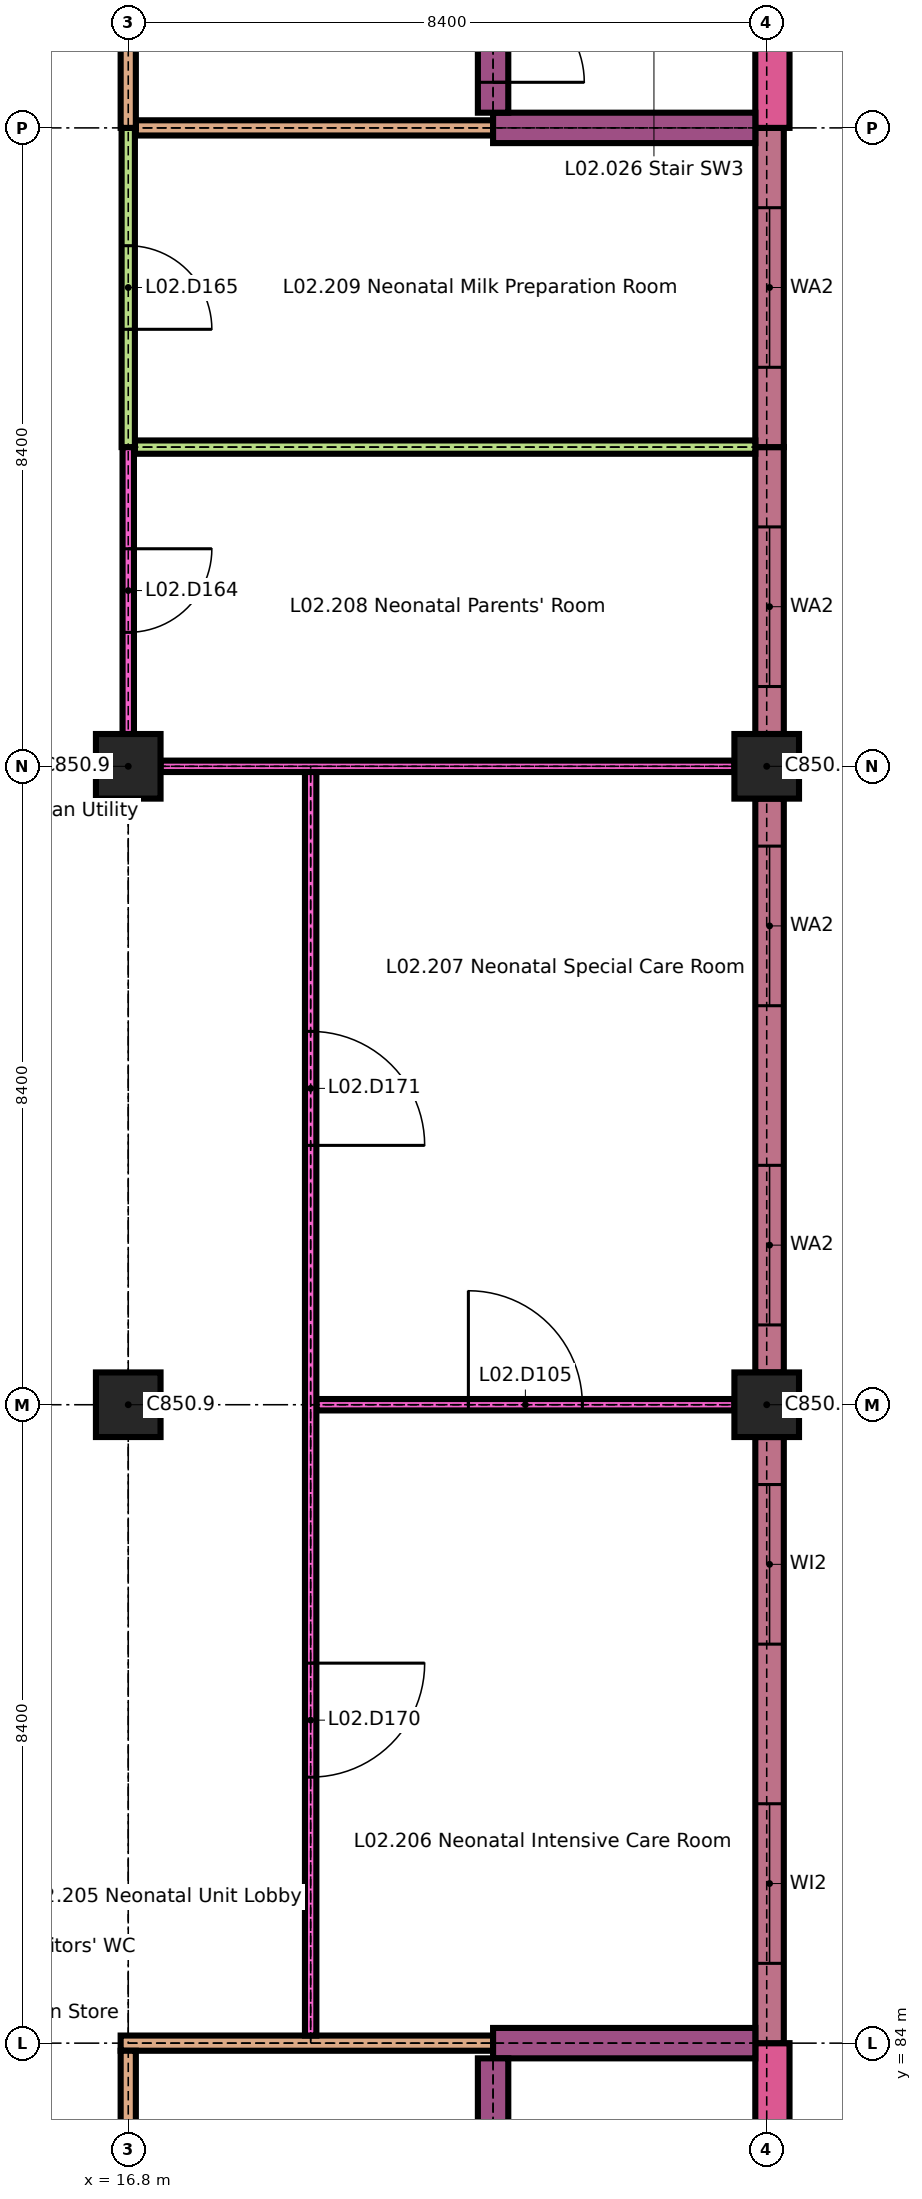
"""IFC4 building model, lengths in metres.
Left out: names, types, materials, properties, quantities, classifications, styles, units other than length and angle.
Written with IfcOpenShell. Run it as: python <this file> out.ifc"""

import sys

from ifc_helpers import new_model, si_unit, direction, frame, frame_2d, origin, origin_2d, place, context, subcontext, project, spatial, rectangle, extrude, element, fill, save


model = new_model("IFC4")
c1 = context("Model", 3, precision=1e-05, world=origin(), true_north=direction((0.0, 1.0)))
c2 = subcontext(c1, "Body", "Model", "MODEL_VIEW")
j1 = project(units=[si_unit("LENGTHUNIT", "METRE"), si_unit("PLANEANGLEUNIT", "RADIAN")], contexts=[c1])
p1 = place(None, origin())
s1 = spatial("IfcSite", under=j1, at=p1, CompositionType="ELEMENT")
p2 = place(p1, origin())
s2 = spatial("IfcBuilding", under=s1, at=p2, CompositionType="ELEMENT")
p3 = place(p2, frame((0.0, 0.0, 8.4)))
s3 = spatial("IfcBuildingStorey", under=s2, at=p3, CompositionType="ELEMENT", Elevation=8.4)
for number, where, z_axis, x_axis in (
    (1, (16.8, 92.4, 0.0), (0.0, 0.0, 1.0), (1.0, 0.0, 0.0)),
    (2, (25.2, 92.4, 0.0), (0.0, 0.0, 1.0), (1.0, 0.0, 0.0)),
    (3, (16.8, 100.8, 0.0), (0.0, 0.0, 1.0), (1.0, 0.0, 0.0)),
    (4, (25.2, 100.8, 0.0), (0.0, 0.0, 1.0), (1.0, 0.0, 0.0)),
):
    element("IfcColumn", number, at=place(p3, frame(where, z_axis=z_axis, x_axis=x_axis)), inside=s3, PredefinedType="COLUMN", context=c2, shape_type="SweptSolid", body=[
        extrude(rectangle(XDim=0.85, YDim=0.85, at=origin_2d()), origin(), (0.0, 0.0, 1.0), 4.2),
    ])
p4 = place(p3, frame((25.275, 80.15, 0.0), z_axis=(0.0, 0.0, 1.0), x_axis=(0.0, 1.0, 0.0)))
e5 = element("IfcWall", 5, at=p4, inside=s3, PredefinedType="SOLIDWALL", context=c2, shape_type="SweptSolid", body=[
    extrude(rectangle(XDim=3.85, YDim=0.45, at=frame_2d((1.925, 0.0))), origin(), (0.0, 0.0, 1.0), 4.2),
])
p5 = place(p3, frame((25.238, 84.0, 0.0), z_axis=(0.0, 0.0, 1.0), x_axis=(0.0, 1.0, 0.0)))
e6 = element("IfcWall", 6, at=p5, inside=s3, PredefinedType="SOLIDWALL", context=c2, shape_type="SweptSolid", body=[
    extrude(rectangle(XDim=7.975, YDim=0.375, at=frame_2d((3.988, 0.0))), origin(), (0.0, 0.0, 1.0), 3.9),
])
p6 = place(p5, frame((1.05, 0.0, 0.9)))
e7 = element("IfcOpeningElement", 7, at=p6, cuts=e6, PredefinedType="OPENING", context=c2, shape_type="SweptSolid", body=[
    extrude(rectangle(XDim=2.1, YDim=2.1, at=frame_2d((1.05, 1.05))), frame((0.0, 0.198, 0.0), z_axis=(0.0, -1.0, 0.0), x_axis=(1.0, 0.0, 0.0)), (0.0, 0.0, 1.0), 0.395),
])
p7 = place(p5, frame((5.25, 0.0, 0.9)))
e8 = element("IfcOpeningElement", 8, at=p7, cuts=e6, PredefinedType="OPENING", context=c2, shape_type="SweptSolid", body=[
    extrude(rectangle(XDim=2.1, YDim=2.1, at=frame_2d((1.05, 1.05))), frame((0.0, 0.198, 0.0), z_axis=(0.0, -1.0, 0.0), x_axis=(1.0, 0.0, 0.0)), (0.0, 0.0, 1.0), 0.395),
])
p8 = place(p3, frame((25.238, 92.825, 0.0), z_axis=(0.0, 0.0, 1.0), x_axis=(0.0, 1.0, 0.0)))
e9 = element("IfcWall", 9, at=p8, inside=s3, PredefinedType="SOLIDWALL", context=c2, shape_type="SweptSolid", body=[
    extrude(rectangle(XDim=7.55, YDim=0.375, at=frame_2d((3.775, 0.0))), origin(), (0.0, 0.0, 1.0), 3.9),
])
p9 = place(p8, frame((0.625, 0.0, 0.9)))
e10 = element("IfcOpeningElement", 10, at=p9, cuts=e9, PredefinedType="OPENING", context=c2, shape_type="SweptSolid", body=[
    extrude(rectangle(XDim=2.1, YDim=2.1, at=frame_2d((1.05, 1.05))), frame((0.0, 0.198, 0.0), z_axis=(0.0, -1.0, 0.0), x_axis=(1.0, 0.0, 0.0)), (0.0, 0.0, 1.0), 0.395),
])
p10 = place(p8, frame((4.825, 0.0, 0.9)))
e11 = element("IfcOpeningElement", 11, at=p10, cuts=e9, PredefinedType="OPENING", context=c2, shape_type="SweptSolid", body=[
    extrude(rectangle(XDim=2.1, YDim=2.1, at=frame_2d((1.05, 1.05))), frame((0.0, 0.198, 0.0), z_axis=(0.0, -1.0, 0.0), x_axis=(1.0, 0.0, 0.0)), (0.0, 0.0, 1.0), 0.395),
])
p11 = place(p3, frame((25.238, 101.225, 0.0), z_axis=(0.0, 0.0, 1.0), x_axis=(0.0, 1.0, 0.0)))
e12 = element("IfcWall", 12, at=p11, inside=s3, PredefinedType="SOLIDWALL", context=c2, shape_type="SweptSolid", body=[
    extrude(rectangle(XDim=3.775, YDim=0.375, at=frame_2d((1.887, 0.0))), origin(), (0.0, 0.0, 1.0), 3.9),
])
p12 = place(p11, frame((0.625, 0.0, 0.9)))
e13 = element("IfcOpeningElement", 13, at=p12, cuts=e12, PredefinedType="OPENING", context=c2, shape_type="SweptSolid", body=[
    extrude(rectangle(XDim=2.1, YDim=2.1, at=frame_2d((1.05, 1.05))), frame((0.0, 0.198, 0.0), z_axis=(0.0, -1.0, 0.0), x_axis=(1.0, 0.0, 0.0)), (0.0, 0.0, 1.0), 0.395),
])
p13 = place(p3, frame((25.238, 105.0, 0.0), z_axis=(0.0, 0.0, 1.0), x_axis=(0.0, 1.0, 0.0)))
e14 = element("IfcWall", 14, at=p13, inside=s3, PredefinedType="SOLIDWALL", context=c2, shape_type="SweptSolid", body=[
    extrude(rectangle(XDim=4.2, YDim=0.375, at=frame_2d((2.1, 0.0))), origin(), (0.0, 0.0, 1.0), 3.9),
])
p14 = place(p13, frame((1.05, 0.0, 0.9)))
e15 = element("IfcOpeningElement", 15, at=p14, cuts=e14, PredefinedType="OPENING", context=c2, shape_type="SweptSolid", body=[
    extrude(rectangle(XDim=2.1, YDim=2.1, at=frame_2d((1.05, 1.05))), frame((0.0, 0.198, 0.0), z_axis=(0.0, -1.0, 0.0), x_axis=(1.0, 0.0, 0.0)), (0.0, 0.0, 1.0), 0.395),
])
p15 = place(p3, frame((25.275, 109.2, 0.0), z_axis=(0.0, 0.0, 1.0), x_axis=(0.0, 1.0, 0.0)))
e16 = element("IfcWall", 16, at=p15, inside=s3, PredefinedType="SOLIDWALL", context=c2, shape_type="SweptSolid", body=[
    extrude(rectangle(XDim=3.15, YDim=0.45, at=frame_2d((1.575, 0.0))), origin(), (0.0, 0.0, 1.0), 4.2),
])
p16 = place(p3, frame((16.7, 84.0, 0.0), z_axis=(0.0, 0.0, 1.0), x_axis=(1.0, 0.0, 0.0)))
e17 = element("IfcWall", 17, at=p16, inside=s3, PredefinedType="PARTITIONING", context=c2, shape_type="SweptSolid", body=[
    extrude(rectangle(XDim=4.9, YDim=0.2, at=frame_2d((2.45, 0.0))), origin(), (0.0, 0.0, 1.0), 4.2),
])
p17 = place(p3, frame((21.6, 84.0, 0.0), z_axis=(0.0, 0.0, 1.0), x_axis=(1.0, 0.0, 0.0)))
e18 = element("IfcWall", 18, at=p17, inside=s3, PredefinedType="SHEAR", context=c2, shape_type="SweptSolid", body=[
    extrude(rectangle(XDim=3.45, YDim=0.4, at=frame_2d((1.725, 0.0))), origin(), (0.0, 0.0, 1.0), 4.2),
])
p18 = place(p3, frame((19.275, 92.4, 0.0), z_axis=(0.0, 0.0, 1.0), x_axis=(1.0, 0.0, 0.0)))
e19 = element("IfcWall", 19, at=p18, inside=s3, PredefinedType="PARTITIONING", context=c2, shape_type="SweptSolid", body=[
    extrude(rectangle(XDim=5.5, YDim=0.15, at=frame_2d((2.75, 0.0))), origin(), (0.0, 0.0, 1.0), 4.2),
])
p19 = place(p18, frame((2.0, 0.0, 0.0)))
e20 = element("IfcOpeningElement", 20, at=p19, cuts=e19, PredefinedType="OPENING", context=c2, shape_type="SweptSolid", body=[
    extrude(rectangle(XDim=1.5, YDim=2.4, at=frame_2d((0.75, 1.2))), frame((0.0, 0.085, 0.0), z_axis=(0.0, -1.0, 0.0), x_axis=(1.0, 0.0, 0.0)), (0.0, 0.0, 1.0), 0.17),
])
p20 = place(p3, frame((17.225, 100.8, 0.0), z_axis=(0.0, 0.0, 1.0), x_axis=(1.0, 0.0, 0.0)))
e21 = element("IfcWall", 21, at=p20, inside=s3, PredefinedType="PARTITIONING", context=c2, shape_type="SweptSolid", body=[
    extrude(rectangle(XDim=7.55, YDim=0.15, at=frame_2d((3.775, 0.0))), origin(), (0.0, 0.0, 1.0), 4.2),
])
p21 = place(p3, frame((16.887, 105.0, 0.0), z_axis=(0.0, 0.0, 1.0), x_axis=(1.0, 0.0, 0.0)))
e22 = element("IfcWall", 22, at=p21, inside=s3, PredefinedType="PARTITIONING", context=c2, shape_type="SweptSolid", body=[
    extrude(rectangle(XDim=8.163, YDim=0.175, at=frame_2d((4.081, 0.0))), origin(), (0.0, 0.0, 1.0), 4.2),
])
p22 = place(p3, frame((16.9, 109.2, 0.0), z_axis=(0.0, 0.0, 1.0), x_axis=(1.0, 0.0, 0.0)))
e23 = element("IfcWall", 23, at=p22, inside=s3, PredefinedType="PARTITIONING", context=c2, shape_type="SweptSolid", body=[
    extrude(rectangle(XDim=4.7, YDim=0.2, at=frame_2d((2.35, 0.0))), origin(), (0.0, 0.0, 1.0), 4.2),
])
p23 = place(p3, frame((21.6, 109.2, 0.0), z_axis=(0.0, 0.0, 1.0), x_axis=(1.0, 0.0, 0.0)))
e24 = element("IfcWall", 24, at=p23, inside=s3, PredefinedType="SHEAR", context=c2, shape_type="SweptSolid", body=[
    extrude(rectangle(XDim=3.45, YDim=0.4, at=frame_2d((1.725, 0.0))), origin(), (0.0, 0.0, 1.0), 4.2),
])
p24 = place(p3, frame((16.8, 75.6, 0.0), z_axis=(0.0, 0.0, 1.0), x_axis=(0.0, 1.0, 0.0)))
e25 = element("IfcWall", 25, at=p24, inside=s3, PredefinedType="PARTITIONING", context=c2, shape_type="SweptSolid", body=[
    extrude(rectangle(XDim=8.3, YDim=0.2, at=frame_2d((4.15, 0.0))), origin(), (0.0, 0.0, 1.0), 4.2),
])
p25 = place(p24, frame((3.45, 0.0, 0.0)))
e26 = element("IfcOpeningElement", 26, at=p25, cuts=e25, PredefinedType="OPENING", context=c2, shape_type="SweptSolid", body=[
    extrude(rectangle(XDim=1.4, YDim=2.1, at=frame_2d((0.7, 1.05))), frame((0.0, 0.11, 0.0), z_axis=(0.0, -1.0, 0.0), x_axis=(1.0, 0.0, 0.0)), (0.0, 0.0, 1.0), 0.22),
])
p26 = place(p3, frame((16.8, 101.225, 0.0), z_axis=(0.0, 0.0, 1.0), x_axis=(0.0, 1.0, 0.0)))
e27 = element("IfcWall", 27, at=p26, inside=s3, PredefinedType="PARTITIONING", context=c2, shape_type="SweptSolid", body=[
    extrude(rectangle(XDim=3.775, YDim=0.15, at=frame_2d((1.887, 0.0))), origin(), (0.0, 0.0, 1.0), 4.2),
])
p27 = place(p26, frame((1.337, 0.0, 0.0)))
e28 = element("IfcOpeningElement", 28, at=p27, cuts=e27, PredefinedType="OPENING", context=c2, shape_type="SweptSolid", body=[
    extrude(rectangle(XDim=1.1, YDim=2.1, at=frame_2d((0.55, 1.05))), frame((0.0, 0.085, 0.0), z_axis=(0.0, -1.0, 0.0), x_axis=(1.0, 0.0, 0.0)), (0.0, 0.0, 1.0), 0.17),
])
p28 = place(p3, frame((16.8, 105.0, 0.0), z_axis=(0.0, 0.0, 1.0), x_axis=(0.0, 1.0, 0.0)))
e29 = element("IfcWall", 29, at=p28, inside=s3, PredefinedType="PARTITIONING", context=c2, shape_type="SweptSolid", body=[
    extrude(rectangle(XDim=4.2, YDim=0.175, at=frame_2d((2.1, 0.0))), origin(), (0.0, 0.0, 1.0), 4.2),
])
p29 = place(p28, frame((1.55, 0.0, 0.0)))
e30 = element("IfcOpeningElement", 30, at=p29, cuts=e29, PredefinedType="OPENING", context=c2, shape_type="SweptSolid", body=[
    extrude(rectangle(XDim=1.1, YDim=2.1, at=frame_2d((0.55, 1.05))), frame((0.0, 0.097, 0.0), z_axis=(0.0, -1.0, 0.0), x_axis=(1.0, 0.0, 0.0)), (0.0, 0.0, 1.0), 0.195),
])
p30 = place(p3, frame((16.8, 109.2, 0.0), z_axis=(0.0, 0.0, 1.0), x_axis=(0.0, 1.0, 0.0)))
e31 = element("IfcWall", 31, at=p30, inside=s3, PredefinedType="PARTITIONING", context=c2, shape_type="SweptSolid", body=[
    extrude(rectangle(XDim=8.25, YDim=0.2, at=frame_2d((4.125, 0.0))), origin(), (0.0, 0.0, 1.0), 4.2),
])
p31 = place(p30, frame((3.425, 0.0, 0.0)))
e32 = element("IfcOpeningElement", 32, at=p31, cuts=e31, PredefinedType="OPENING", context=c2, shape_type="SweptSolid", body=[
    extrude(rectangle(XDim=1.4, YDim=2.1, at=frame_2d((0.7, 1.05))), frame((0.0, 0.11, 0.0), z_axis=(0.0, -1.0, 0.0), x_axis=(1.0, 0.0, 0.0)), (0.0, 0.0, 1.0), 0.22),
])
p32 = place(p3, frame((19.2, 84.1, 0.0), z_axis=(0.0, 0.0, 1.0), x_axis=(0.0, 1.0, 0.0)))
e33 = element("IfcWall", 33, at=p32, inside=s3, PredefinedType="PARTITIONING", context=c2, shape_type="SweptSolid", body=[
    extrude(rectangle(XDim=16.625, YDim=0.15, at=frame_2d((8.312, 0.0))), origin(), (0.0, 0.0, 1.0), 4.2),
])
p33 = place(p32, frame((3.4, 0.0, 0.0)))
e34 = element("IfcOpeningElement", 34, at=p33, cuts=e33, PredefinedType="OPENING", context=c2, shape_type="SweptSolid", body=[
    extrude(rectangle(XDim=1.5, YDim=2.4, at=frame_2d((0.75, 1.2))), frame((0.0, 0.085, 0.0), z_axis=(0.0, -1.0, 0.0), x_axis=(1.0, 0.0, 0.0)), (0.0, 0.0, 1.0), 0.17),
])
p34 = place(p32, frame((11.712, 0.0, 0.0)))
e35 = element("IfcOpeningElement", 35, at=p34, cuts=e33, PredefinedType="OPENING", context=c2, shape_type="SweptSolid", body=[
    extrude(rectangle(XDim=1.5, YDim=2.4, at=frame_2d((0.75, 1.2))), frame((0.0, 0.085, 0.0), z_axis=(0.0, -1.0, 0.0), x_axis=(1.0, 0.0, 0.0)), (0.0, 0.0, 1.0), 0.17),
])
p35 = place(p3, frame((21.6, 75.8, 0.0), z_axis=(0.0, 0.0, 1.0), x_axis=(0.0, 1.0, 0.0)))
e36 = element("IfcWall", 36, at=p35, inside=s3, PredefinedType="SHEAR", context=c2, shape_type="SweptSolid", body=[
    extrude(rectangle(XDim=8.0, YDim=0.4, at=frame_2d((4.0, 0.0))), origin(), (0.0, 0.0, 1.0), 4.2),
])
p36 = place(p35, frame((0.4, 0.0, 0.0)))
e37 = element("IfcOpeningElement", 37, at=p36, cuts=e36, PredefinedType="OPENING", context=c2, shape_type="SweptSolid", body=[
    extrude(rectangle(XDim=1.2, YDim=2.1, at=frame_2d((0.6, 1.05))), frame((0.0, 0.21, 0.0), z_axis=(0.0, -1.0, 0.0), x_axis=(1.0, 0.0, 0.0)), (0.0, 0.0, 1.0), 0.42),
])
p37 = place(p3, frame((21.6, 109.4, 0.0), z_axis=(0.0, 0.0, 1.0), x_axis=(0.0, 1.0, 0.0)))
e38 = element("IfcWall", 38, at=p37, inside=s3, PredefinedType="SHEAR", context=c2, shape_type="SweptSolid", body=[
    extrude(rectangle(XDim=8.05, YDim=0.4, at=frame_2d((4.025, 0.0))), origin(), (0.0, 0.0, 1.0), 4.2),
])
p38 = place(p37, frame((0.4, 0.0, 0.0)))
e39 = element("IfcOpeningElement", 39, at=p38, cuts=e38, PredefinedType="OPENING", context=c2, shape_type="SweptSolid", body=[
    extrude(rectangle(XDim=1.2, YDim=2.1, at=frame_2d((0.6, 1.05))), frame((0.0, 0.21, 0.0), z_axis=(0.0, -1.0, 0.0), x_axis=(1.0, 0.0, 0.0)), (0.0, 0.0, 1.0), 0.42),
])
p39 = place(p6, origin())
e40 = element("IfcWindow", 40, at=p39, inside=s3, PartitioningType="SINGLE_PANEL", PredefinedType="WINDOW", context=c2, shape_type="SweptSolid", body=[
    extrude(rectangle(XDim=2.1, YDim=2.1, at=frame_2d((1.05, 1.05))), frame((0.0, 0.045, 0.0), z_axis=(0.0, -1.0, 0.0), x_axis=(1.0, 0.0, 0.0)), (0.0, 0.0, 1.0), 0.09),
])
fill(e7, e40)
p40 = place(p7, origin())
e41 = element("IfcWindow", 41, at=p40, inside=s3, PartitioningType="SINGLE_PANEL", PredefinedType="WINDOW", context=c2, shape_type="SweptSolid", body=[
    extrude(rectangle(XDim=2.1, YDim=2.1, at=frame_2d((1.05, 1.05))), frame((0.0, 0.045, 0.0), z_axis=(0.0, -1.0, 0.0), x_axis=(1.0, 0.0, 0.0)), (0.0, 0.0, 1.0), 0.09),
])
fill(e8, e41)
p41 = place(p9, origin())
e42 = element("IfcWindow", 42, at=p41, inside=s3, PartitioningType="DOUBLE_PANEL_VERTICAL", PredefinedType="WINDOW", context=c2, shape_type="SweptSolid", body=[
    extrude(rectangle(XDim=2.1, YDim=2.1, at=frame_2d((1.05, 1.05))), frame((0.0, 0.03, 0.0), z_axis=(0.0, -1.0, 0.0), x_axis=(1.0, 0.0, 0.0)), (0.0, 0.0, 1.0), 0.06),
])
fill(e10, e42)
p42 = place(p10, origin())
e43 = element("IfcWindow", 43, at=p42, inside=s3, PartitioningType="DOUBLE_PANEL_VERTICAL", PredefinedType="WINDOW", context=c2, shape_type="SweptSolid", body=[
    extrude(rectangle(XDim=2.1, YDim=2.1, at=frame_2d((1.05, 1.05))), frame((0.0, 0.03, 0.0), z_axis=(0.0, -1.0, 0.0), x_axis=(1.0, 0.0, 0.0)), (0.0, 0.0, 1.0), 0.06),
])
fill(e11, e43)
p43 = place(p12, origin())
e44 = element("IfcWindow", 44, at=p43, inside=s3, PartitioningType="DOUBLE_PANEL_VERTICAL", PredefinedType="WINDOW", context=c2, shape_type="SweptSolid", body=[
    extrude(rectangle(XDim=2.1, YDim=2.1, at=frame_2d((1.05, 1.05))), frame((0.0, 0.03, 0.0), z_axis=(0.0, -1.0, 0.0), x_axis=(1.0, 0.0, 0.0)), (0.0, 0.0, 1.0), 0.06),
])
fill(e13, e44)
p44 = place(p14, origin())
e45 = element("IfcWindow", 45, at=p44, inside=s3, PartitioningType="DOUBLE_PANEL_VERTICAL", PredefinedType="WINDOW", context=c2, shape_type="SweptSolid", body=[
    extrude(rectangle(XDim=2.1, YDim=2.1, at=frame_2d((1.05, 1.05))), frame((0.0, 0.03, 0.0), z_axis=(0.0, -1.0, 0.0), x_axis=(1.0, 0.0, 0.0)), (0.0, 0.0, 1.0), 0.06),
])
fill(e15, e45)
p45 = place(p19, origin())
e46 = element("IfcDoor", 46, at=p45, inside=s3, OperationType="SINGLE_SWING_RIGHT", PredefinedType="DOOR", context=c2, shape_type="SweptSolid", body=[
    extrude(rectangle(XDim=1.5, YDim=2.4, at=frame_2d((0.75, 1.2))), frame((0.0, 0.03, 0.0), z_axis=(0.0, -1.0, 0.0), x_axis=(1.0, 0.0, 0.0)), (0.0, 0.0, 1.0), 0.06),
])
fill(e20, e46)
p46 = place(p27, origin())
e47 = element("IfcDoor", 47, at=p46, inside=s3, OperationType="SINGLE_SWING_RIGHT", PredefinedType="DOOR", context=c2, shape_type="SweptSolid", body=[
    extrude(rectangle(XDim=1.1, YDim=2.1, at=frame_2d((0.55, 1.05))), frame((0.0, 0.025, 0.0), z_axis=(0.0, -1.0, 0.0), x_axis=(1.0, 0.0, 0.0)), (0.0, 0.0, 1.0), 0.05),
])
fill(e28, e47)
p47 = place(p29, origin())
e48 = element("IfcDoor", 48, at=p47, inside=s3, OperationType="SINGLE_SWING_LEFT", PredefinedType="DOOR", context=c2, shape_type="SweptSolid", body=[
    extrude(rectangle(XDim=1.1, YDim=2.1, at=frame_2d((0.55, 1.05))), frame((0.0, 0.035, 0.0), z_axis=(0.0, -1.0, 0.0), x_axis=(1.0, 0.0, 0.0)), (0.0, 0.0, 1.0), 0.07),
])
fill(e30, e48)
p48 = place(p33, origin())
e49 = element("IfcDoor", 49, at=p48, inside=s3, OperationType="SINGLE_SWING_RIGHT", PredefinedType="DOOR", context=c2, shape_type="SweptSolid", body=[
    extrude(rectangle(XDim=1.5, YDim=2.4, at=frame_2d((0.75, 1.2))), frame((0.0, 0.03, 0.0), z_axis=(0.0, -1.0, 0.0), x_axis=(1.0, 0.0, 0.0)), (0.0, 0.0, 1.0), 0.06),
])
fill(e34, e49)
p49 = place(p34, origin())
e50 = element("IfcDoor", 50, at=p49, inside=s3, OperationType="SINGLE_SWING_LEFT", PredefinedType="DOOR", context=c2, shape_type="SweptSolid", body=[
    extrude(rectangle(XDim=1.5, YDim=2.4, at=frame_2d((0.75, 1.2))), frame((0.0, 0.03, 0.0), z_axis=(0.0, -1.0, 0.0), x_axis=(1.0, 0.0, 0.0)), (0.0, 0.0, 1.0), 0.06),
])
fill(e35, e50)
p50 = place(p38, origin())
e51 = element("IfcDoor", 51, at=p50, inside=s3, OperationType="SINGLE_SWING_LEFT", PredefinedType="DOOR", context=c2, shape_type="SweptSolid", body=[
    extrude(rectangle(XDim=1.2, YDim=2.1, at=frame_2d((0.6, 1.05))), frame((0.0, 0.025, 0.0), z_axis=(0.0, -1.0, 0.0), x_axis=(1.0, 0.0, 0.0)), (0.0, 0.0, 1.0), 0.05),
])
fill(e39, e51)
save(model, sys.argv[1])
